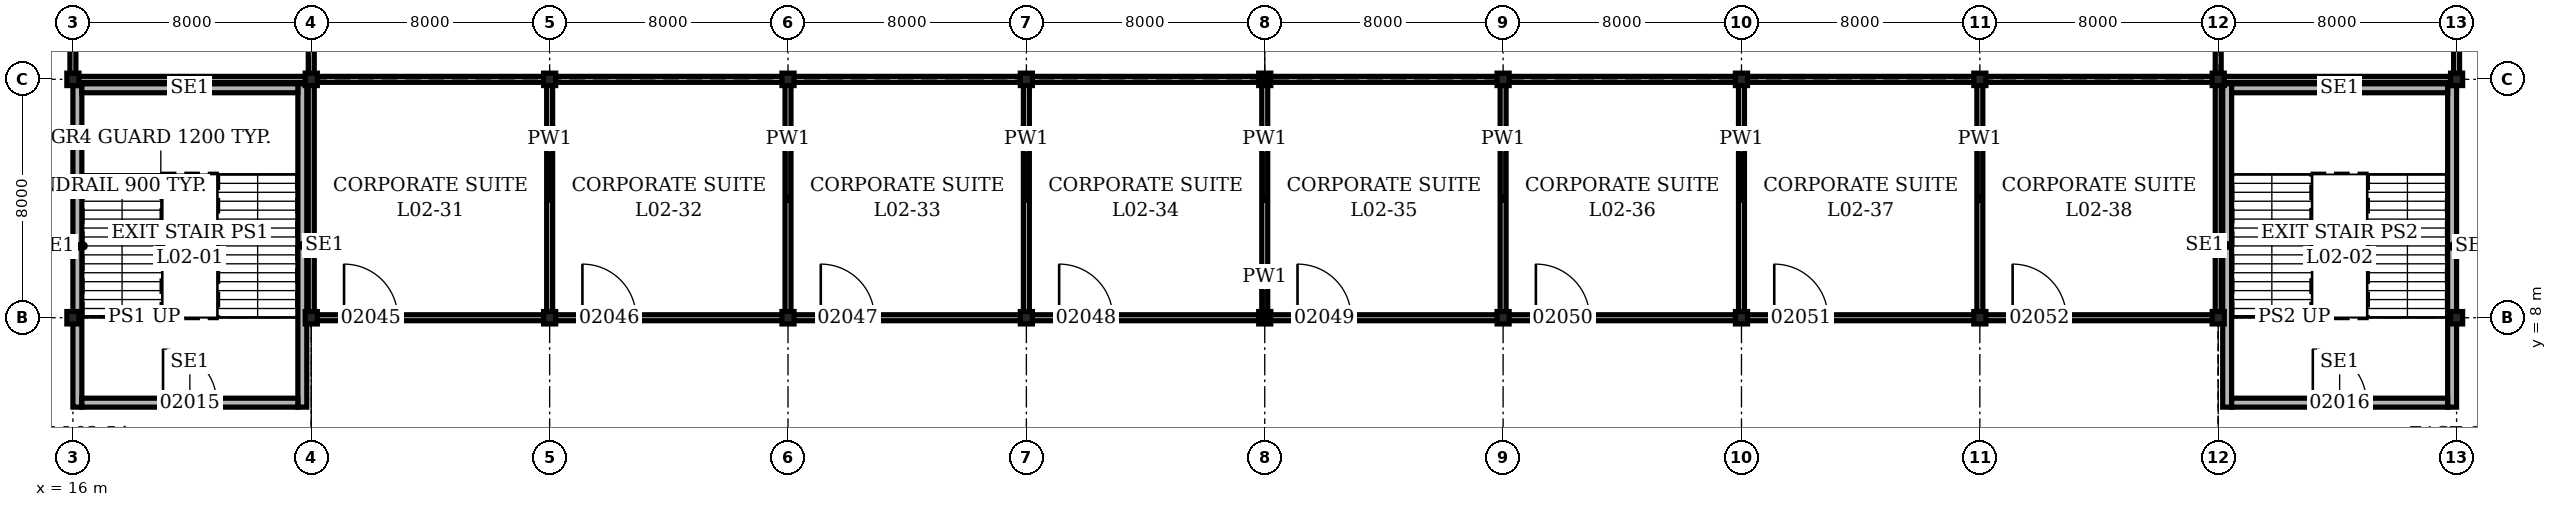
"""IFC4 building model, lengths in metres.
Left out: names, types, materials, properties, quantities, classifications, styles, units other than length and angle.
Written with IfcOpenShell. Run it as: python <this file> out.ifc"""

import sys

from ifc_helpers import new_model, si_unit, direction, frame, frame_2d, origin, origin_2d, place, context, subcontext, project, spatial, rectangle, i_section, extrude, element, fill, save


model = new_model("IFC4")
c1 = context("Model", 3, precision=1e-05, world=origin(), true_north=direction((0.0, 1.0)))
c2 = subcontext(c1, "Body", "Model", "MODEL_VIEW")
j1 = project(units=[si_unit("LENGTHUNIT", "METRE"), si_unit("PLANEANGLEUNIT", "RADIAN")], contexts=[c1])
p1 = place(None, origin())
s1 = spatial("IfcSite", under=j1, at=p1, CompositionType="ELEMENT")
p2 = place(p1, origin())
s2 = spatial("IfcBuilding", under=s1, at=p2, CompositionType="ELEMENT")
p3 = place(p2, frame((0.0, 0.0, 9.9)))
s3 = spatial("IfcBuildingStorey", under=s2, at=p3, CompositionType="ELEMENT", Elevation=9.9)
for number, where, z_axis, x_axis in (
    (1, (16.0, 8.0, 0.0), (0.0, 0.0, 1.0), (1.0, 0.0, 0.0)),
    (2, (16.0, 16.0, 0.0), (0.0, 0.0, 1.0), (1.0, 0.0, 0.0)),
    (3, (24.0, 8.0, 0.0), (0.0, 0.0, 1.0), (1.0, 0.0, 0.0)),
    (4, (24.0, 16.0, 0.0), (0.0, 0.0, 1.0), (1.0, 0.0, 0.0)),
    (5, (32.0, 8.0, 0.0), (0.0, 0.0, 1.0), (1.0, 0.0, 0.0)),
    (6, (32.0, 16.0, 0.0), (0.0, 0.0, 1.0), (1.0, 0.0, 0.0)),
    (7, (40.0, 8.0, 0.0), (0.0, 0.0, 1.0), (1.0, 0.0, 0.0)),
    (8, (40.0, 16.0, 0.0), (0.0, 0.0, 1.0), (1.0, 0.0, 0.0)),
    (9, (48.0, 8.0, 0.0), (0.0, 0.0, 1.0), (1.0, 0.0, 0.0)),
    (10, (48.0, 16.0, 0.0), (0.0, 0.0, 1.0), (1.0, 0.0, 0.0)),
    (11, (56.0, 8.0, 0.0), (0.0, 0.0, 1.0), (1.0, 0.0, 0.0)),
    (12, (56.0, 16.0, 0.0), (0.0, 0.0, 1.0), (1.0, 0.0, 0.0)),
    (13, (64.0, 8.0, 0.0), (0.0, 0.0, 1.0), (1.0, 0.0, 0.0)),
    (14, (64.0, 16.0, 0.0), (0.0, 0.0, 1.0), (1.0, 0.0, 0.0)),
    (15, (72.0, 8.0, 0.0), (0.0, 0.0, 1.0), (1.0, 0.0, 0.0)),
    (16, (72.0, 16.0, 0.0), (0.0, 0.0, 1.0), (1.0, 0.0, 0.0)),
    (17, (80.0, 8.0, 0.0), (0.0, 0.0, 1.0), (1.0, 0.0, 0.0)),
    (18, (80.0, 16.0, 0.0), (0.0, 0.0, 1.0), (1.0, 0.0, 0.0)),
    (19, (88.0, 8.0, 0.0), (0.0, 0.0, 1.0), (1.0, 0.0, 0.0)),
    (20, (88.0, 16.0, 0.0), (0.0, 0.0, 1.0), (1.0, 0.0, 0.0)),
    (21, (96.0, 8.0, 0.0), (0.0, 0.0, 1.0), (1.0, 0.0, 0.0)),
    (22, (96.0, 16.0, 0.0), (0.0, 0.0, 1.0), (1.0, 0.0, 0.0)),
):
    element("IfcColumn", number, at=place(p3, frame(where, z_axis=z_axis, x_axis=x_axis)), inside=s3, PredefinedType="COLUMN", context=c2, shape_type="SweptSolid", body=[
        extrude(i_section(OverallWidth=0.406, OverallDepth=0.417, WebThickness=0.03, FlangeThickness=0.048, at=origin_2d()), origin(), (0.0, 0.0, 1.0), 5.0),
    ])
p4 = place(p3, frame((16.15, 5.0, 0.0), z_axis=(0.0, 0.0, 1.0), x_axis=(0.0, 1.0, 0.0)))
e23 = element("IfcWall", 23, at=p4, inside=s3, PredefinedType="SOLIDWALL", context=c2, shape_type="SweptSolid", body=[
    extrude(rectangle(XDim=10.792, YDim=0.3, at=frame_2d((5.396, 0.0))), origin(), (0.0, 0.0, 1.0), 4.8),
])
p5 = place(p3, frame((23.7, 5.0, 0.0), z_axis=(0.0, 0.0, 1.0), x_axis=(0.0, 1.0, 0.0)))
e24 = element("IfcWall", 24, at=p5, inside=s3, PredefinedType="SOLIDWALL", context=c2, shape_type="SweptSolid", body=[
    extrude(rectangle(XDim=10.85, YDim=0.3, at=frame_2d((5.425, 0.0))), origin(), (0.0, 0.0, 1.0), 4.8),
])
p6 = place(p3, frame((16.3, 5.15, 0.0), z_axis=(0.0, 0.0, 1.0), x_axis=(1.0, 0.0, 0.0)))
e25 = element("IfcWall", 25, at=p6, inside=s3, PredefinedType="SOLIDWALL", context=c2, shape_type="SweptSolid", body=[
    extrude(rectangle(XDim=7.25, YDim=0.3, at=frame_2d((3.625, 0.0))), origin(), (0.0, 0.0, 1.0), 4.8),
])
p7 = place(p6, frame((2.725, 0.0, 0.0)))
e26 = element("IfcOpeningElement", 26, at=p7, cuts=e25, PredefinedType="OPENING", context=c2, shape_type="SweptSolid", body=[
    extrude(rectangle(XDim=1.8, YDim=2.1, at=frame_2d((0.9, 1.05))), frame((0.0, 0.16, 0.0), z_axis=(0.0, -1.0, 0.0), x_axis=(1.0, 0.0, 0.0)), (0.0, 0.0, 1.0), 0.32),
])
p8 = place(p3, frame((16.3, 15.7, 0.0), z_axis=(0.0, 0.0, 1.0), x_axis=(1.0, 0.0, 0.0)))
e27 = element("IfcWall", 27, at=p8, inside=s3, PredefinedType="SOLIDWALL", context=c2, shape_type="SweptSolid", body=[
    extrude(rectangle(XDim=7.25, YDim=0.3, at=frame_2d((3.625, 0.0))), origin(), (0.0, 0.0, 1.0), 4.8),
])
p9 = place(p3, frame((88.3, 5.0, 0.0), z_axis=(0.0, 0.0, 1.0), x_axis=(0.0, 1.0, 0.0)))
e28 = element("IfcWall", 28, at=p9, inside=s3, PredefinedType="SOLIDWALL", context=c2, shape_type="SweptSolid", body=[
    extrude(rectangle(XDim=10.85, YDim=0.3, at=frame_2d((5.425, 0.0))), origin(), (0.0, 0.0, 1.0), 4.8),
])
p10 = place(p3, frame((95.85, 5.0, 0.0), z_axis=(0.0, 0.0, 1.0), x_axis=(0.0, 1.0, 0.0)))
e29 = element("IfcWall", 29, at=p10, inside=s3, PredefinedType="SOLIDWALL", context=c2, shape_type="SweptSolid", body=[
    extrude(rectangle(XDim=10.792, YDim=0.3, at=frame_2d((5.396, 0.0))), origin(), (0.0, 0.0, 1.0), 4.8),
])
p11 = place(p3, frame((88.45, 5.15, 0.0), z_axis=(0.0, 0.0, 1.0), x_axis=(1.0, 0.0, 0.0)))
e30 = element("IfcWall", 30, at=p11, inside=s3, PredefinedType="SOLIDWALL", context=c2, shape_type="SweptSolid", body=[
    extrude(rectangle(XDim=7.25, YDim=0.3, at=frame_2d((3.625, 0.0))), origin(), (0.0, 0.0, 1.0), 4.8),
])
p12 = place(p11, frame((2.725, 0.0, 0.0)))
e31 = element("IfcOpeningElement", 31, at=p12, cuts=e30, PredefinedType="OPENING", context=c2, shape_type="SweptSolid", body=[
    extrude(rectangle(XDim=1.8, YDim=2.1, at=frame_2d((0.9, 1.05))), frame((0.0, 0.16, 0.0), z_axis=(0.0, -1.0, 0.0), x_axis=(1.0, 0.0, 0.0)), (0.0, 0.0, 1.0), 0.32),
])
p13 = place(p3, frame((88.45, 15.7, 0.0), z_axis=(0.0, 0.0, 1.0), x_axis=(1.0, 0.0, 0.0)))
e32 = element("IfcWall", 32, at=p13, inside=s3, PredefinedType="SOLIDWALL", context=c2, shape_type="SweptSolid", body=[
    extrude(rectangle(XDim=7.25, YDim=0.3, at=frame_2d((3.625, 0.0))), origin(), (0.0, 0.0, 1.0), 4.8),
])
p14 = place(p3, frame((24.1, 8.0, 0.0), z_axis=(0.0, 0.0, 1.0), x_axis=(1.0, 0.0, 0.0)))
e33 = element("IfcWall", 33, at=p14, inside=s3, PredefinedType="PARTITIONING", context=c2, shape_type="SweptSolid", body=[
    extrude(rectangle(XDim=63.8, YDim=0.2, at=frame_2d((31.9, 0.0))), origin(), (0.0, 0.0, 1.0), 4.028),
])
p15 = place(p14, frame((1.0, 0.0, 0.0)))
e34 = element("IfcOpeningElement", 34, at=p15, cuts=e33, PredefinedType="OPENING", context=c2, shape_type="SweptSolid", body=[
    extrude(rectangle(XDim=1.8, YDim=2.4, at=frame_2d((0.9, 1.2))), frame((0.0, 0.11, 0.0), z_axis=(0.0, -1.0, 0.0), x_axis=(1.0, 0.0, 0.0)), (0.0, 0.0, 1.0), 0.22),
])
p16 = place(p14, frame((9.0, 0.0, 0.0)))
e35 = element("IfcOpeningElement", 35, at=p16, cuts=e33, PredefinedType="OPENING", context=c2, shape_type="SweptSolid", body=[
    extrude(rectangle(XDim=1.8, YDim=2.4, at=frame_2d((0.9, 1.2))), frame((0.0, 0.11, 0.0), z_axis=(0.0, -1.0, 0.0), x_axis=(1.0, 0.0, 0.0)), (0.0, 0.0, 1.0), 0.22),
])
p17 = place(p14, frame((17.0, 0.0, 0.0)))
e36 = element("IfcOpeningElement", 36, at=p17, cuts=e33, PredefinedType="OPENING", context=c2, shape_type="SweptSolid", body=[
    extrude(rectangle(XDim=1.8, YDim=2.4, at=frame_2d((0.9, 1.2))), frame((0.0, 0.11, 0.0), z_axis=(0.0, -1.0, 0.0), x_axis=(1.0, 0.0, 0.0)), (0.0, 0.0, 1.0), 0.22),
])
p18 = place(p14, frame((25.0, 0.0, 0.0)))
e37 = element("IfcOpeningElement", 37, at=p18, cuts=e33, PredefinedType="OPENING", context=c2, shape_type="SweptSolid", body=[
    extrude(rectangle(XDim=1.8, YDim=2.4, at=frame_2d((0.9, 1.2))), frame((0.0, 0.11, 0.0), z_axis=(0.0, -1.0, 0.0), x_axis=(1.0, 0.0, 0.0)), (0.0, 0.0, 1.0), 0.22),
])
p19 = place(p14, frame((33.0, 0.0, 0.0)))
e38 = element("IfcOpeningElement", 38, at=p19, cuts=e33, PredefinedType="OPENING", context=c2, shape_type="SweptSolid", body=[
    extrude(rectangle(XDim=1.8, YDim=2.4, at=frame_2d((0.9, 1.2))), frame((0.0, 0.11, 0.0), z_axis=(0.0, -1.0, 0.0), x_axis=(1.0, 0.0, 0.0)), (0.0, 0.0, 1.0), 0.22),
])
p20 = place(p14, frame((41.0, 0.0, 0.0)))
e39 = element("IfcOpeningElement", 39, at=p20, cuts=e33, PredefinedType="OPENING", context=c2, shape_type="SweptSolid", body=[
    extrude(rectangle(XDim=1.8, YDim=2.4, at=frame_2d((0.9, 1.2))), frame((0.0, 0.11, 0.0), z_axis=(0.0, -1.0, 0.0), x_axis=(1.0, 0.0, 0.0)), (0.0, 0.0, 1.0), 0.22),
])
p21 = place(p14, frame((49.0, 0.0, 0.0)))
e40 = element("IfcOpeningElement", 40, at=p21, cuts=e33, PredefinedType="OPENING", context=c2, shape_type="SweptSolid", body=[
    extrude(rectangle(XDim=1.8, YDim=2.4, at=frame_2d((0.9, 1.2))), frame((0.0, 0.11, 0.0), z_axis=(0.0, -1.0, 0.0), x_axis=(1.0, 0.0, 0.0)), (0.0, 0.0, 1.0), 0.22),
])
p22 = place(p14, frame((57.0, 0.0, 0.0)))
e41 = element("IfcOpeningElement", 41, at=p22, cuts=e33, PredefinedType="OPENING", context=c2, shape_type="SweptSolid", body=[
    extrude(rectangle(XDim=1.8, YDim=2.4, at=frame_2d((0.9, 1.2))), frame((0.0, 0.11, 0.0), z_axis=(0.0, -1.0, 0.0), x_axis=(1.0, 0.0, 0.0)), (0.0, 0.0, 1.0), 0.22),
])
p23 = place(p3, frame((16.1, 16.0, 0.0), z_axis=(0.0, 0.0, 1.0), x_axis=(1.0, 0.0, 0.0)))
e42 = element("IfcWall", 42, at=p23, inside=s3, PredefinedType="PARTITIONING", context=c2, shape_type="SweptSolid", body=[
    extrude(rectangle(XDim=79.8, YDim=0.2, at=frame_2d((39.9, 0.0))), origin(), (0.0, 0.0, 1.0), 4.028),
])
p24 = place(p3, frame((16.0, 16.1, 0.0), z_axis=(0.0, 0.0, 1.0), x_axis=(0.0, 1.0, 0.0)))
e43 = element("IfcWall", 43, at=p24, inside=s3, PredefinedType="PARTITIONING", context=c2, shape_type="SweptSolid", body=[
    extrude(rectangle(XDim=47.8, YDim=0.2, at=frame_2d((23.9, 0.0))), origin(), (0.0, 0.0, 1.0), 4.028),
])
p25 = place(p24, frame((1.0, 0.0, 0.0)))
e44 = element("IfcOpeningElement", 44, at=p25, cuts=e43, PredefinedType="OPENING", context=c2, shape_type="SweptSolid", body=[
    extrude(rectangle(XDim=1.8, YDim=2.4, at=frame_2d((0.9, 1.2))), frame((0.0, 0.11, 0.0), z_axis=(0.0, -1.0, 0.0), x_axis=(1.0, 0.0, 0.0)), (0.0, 0.0, 1.0), 0.22),
])
p26 = place(p24, frame((9.0, 0.0, 0.0)))
e45 = element("IfcOpeningElement", 45, at=p26, cuts=e43, PredefinedType="OPENING", context=c2, shape_type="SweptSolid", body=[
    extrude(rectangle(XDim=1.8, YDim=2.4, at=frame_2d((0.9, 1.2))), frame((0.0, 0.11, 0.0), z_axis=(0.0, -1.0, 0.0), x_axis=(1.0, 0.0, 0.0)), (0.0, 0.0, 1.0), 0.22),
])
p27 = place(p24, frame((17.0, 0.0, 0.0)))
e46 = element("IfcOpeningElement", 46, at=p27, cuts=e43, PredefinedType="OPENING", context=c2, shape_type="SweptSolid", body=[
    extrude(rectangle(XDim=1.8, YDim=2.4, at=frame_2d((0.9, 1.2))), frame((0.0, 0.11, 0.0), z_axis=(0.0, -1.0, 0.0), x_axis=(1.0, 0.0, 0.0)), (0.0, 0.0, 1.0), 0.22),
])
p28 = place(p24, frame((25.0, 0.0, 0.0)))
e47 = element("IfcOpeningElement", 47, at=p28, cuts=e43, PredefinedType="OPENING", context=c2, shape_type="SweptSolid", body=[
    extrude(rectangle(XDim=1.8, YDim=2.4, at=frame_2d((0.9, 1.2))), frame((0.0, 0.11, 0.0), z_axis=(0.0, -1.0, 0.0), x_axis=(1.0, 0.0, 0.0)), (0.0, 0.0, 1.0), 0.22),
])
p29 = place(p24, frame((33.0, 0.0, 0.0)))
e48 = element("IfcOpeningElement", 48, at=p29, cuts=e43, PredefinedType="OPENING", context=c2, shape_type="SweptSolid", body=[
    extrude(rectangle(XDim=1.8, YDim=2.4, at=frame_2d((0.9, 1.2))), frame((0.0, 0.11, 0.0), z_axis=(0.0, -1.0, 0.0), x_axis=(1.0, 0.0, 0.0)), (0.0, 0.0, 1.0), 0.22),
])
p30 = place(p24, frame((41.0, 0.0, 0.0)))
e49 = element("IfcOpeningElement", 49, at=p30, cuts=e43, PredefinedType="OPENING", context=c2, shape_type="SweptSolid", body=[
    extrude(rectangle(XDim=1.8, YDim=2.4, at=frame_2d((0.9, 1.2))), frame((0.0, 0.11, 0.0), z_axis=(0.0, -1.0, 0.0), x_axis=(1.0, 0.0, 0.0)), (0.0, 0.0, 1.0), 0.22),
])
p31 = place(p3, frame((24.0, 8.1, 0.0), z_axis=(0.0, 0.0, 1.0), x_axis=(0.0, 1.0, 0.0)))
e50 = element("IfcWall", 50, at=p31, inside=s3, PredefinedType="PARTITIONING", context=c2, shape_type="SweptSolid", body=[
    extrude(rectangle(XDim=55.8, YDim=0.2, at=frame_2d((27.9, 0.0))), origin(), (0.0, 0.0, 1.0), 4.028),
])
for number, where, z_axis, x_axis in (
    (51, (32.0, 8.1, 0.0), (0.0, 0.0, 1.0), (0.0, 1.0, 0.0)),
    (52, (40.0, 8.1, 0.0), (0.0, 0.0, 1.0), (0.0, 1.0, 0.0)),
    (53, (48.0, 8.1, 0.0), (0.0, 0.0, 1.0), (0.0, 1.0, 0.0)),
    (54, (56.0, 8.1, 0.0), (0.0, 0.0, 1.0), (0.0, 1.0, 0.0)),
    (55, (64.0, 8.1, 0.0), (0.0, 0.0, 1.0), (0.0, 1.0, 0.0)),
    (56, (72.0, 8.1, 0.0), (0.0, 0.0, 1.0), (0.0, 1.0, 0.0)),
    (57, (80.0, 8.1, 0.0), (0.0, 0.0, 1.0), (0.0, 1.0, 0.0)),
):
    element("IfcWall", number, at=place(p3, frame(where, z_axis=z_axis, x_axis=x_axis)), inside=s3, PredefinedType="PARTITIONING", context=c2, shape_type="SweptSolid", body=[
        extrude(rectangle(XDim=7.8, YDim=0.2, at=frame_2d((3.9, 0.0))), origin(), (0.0, 0.0, 1.0), 4.072),
    ])
p32 = place(p3, frame((88.0, 8.1, 0.0), z_axis=(0.0, 0.0, 1.0), x_axis=(0.0, 1.0, 0.0)))
e58 = element("IfcWall", 58, at=p32, inside=s3, PredefinedType="PARTITIONING", context=c2, shape_type="SweptSolid", body=[
    extrude(rectangle(XDim=55.8, YDim=0.2, at=frame_2d((27.9, 0.0))), origin(), (0.0, 0.0, 1.0), 4.028),
])
p33 = place(p3, frame((96.0, 16.1, 0.0), z_axis=(0.0, 0.0, 1.0), x_axis=(0.0, 1.0, 0.0)))
e59 = element("IfcWall", 59, at=p33, inside=s3, PredefinedType="PARTITIONING", context=c2, shape_type="SweptSolid", body=[
    extrude(rectangle(XDim=47.8, YDim=0.2, at=frame_2d((23.9, 0.0))), origin(), (0.0, 0.0, 1.0), 4.028),
])
p34 = place(p33, frame((1.0, 0.0, 0.0)))
e60 = element("IfcOpeningElement", 60, at=p34, cuts=e59, PredefinedType="OPENING", context=c2, shape_type="SweptSolid", body=[
    extrude(rectangle(XDim=1.8, YDim=2.4, at=frame_2d((0.9, 1.2))), frame((0.0, 0.11, 0.0), z_axis=(0.0, -1.0, 0.0), x_axis=(1.0, 0.0, 0.0)), (0.0, 0.0, 1.0), 0.22),
])
p35 = place(p33, frame((9.0, 0.0, 0.0)))
e61 = element("IfcOpeningElement", 61, at=p35, cuts=e59, PredefinedType="OPENING", context=c2, shape_type="SweptSolid", body=[
    extrude(rectangle(XDim=1.8, YDim=2.4, at=frame_2d((0.9, 1.2))), frame((0.0, 0.11, 0.0), z_axis=(0.0, -1.0, 0.0), x_axis=(1.0, 0.0, 0.0)), (0.0, 0.0, 1.0), 0.22),
])
p36 = place(p33, frame((17.0, 0.0, 0.0)))
e62 = element("IfcOpeningElement", 62, at=p36, cuts=e59, PredefinedType="OPENING", context=c2, shape_type="SweptSolid", body=[
    extrude(rectangle(XDim=1.8, YDim=2.4, at=frame_2d((0.9, 1.2))), frame((0.0, 0.11, 0.0), z_axis=(0.0, -1.0, 0.0), x_axis=(1.0, 0.0, 0.0)), (0.0, 0.0, 1.0), 0.22),
])
p37 = place(p33, frame((25.0, 0.0, 0.0)))
e63 = element("IfcOpeningElement", 63, at=p37, cuts=e59, PredefinedType="OPENING", context=c2, shape_type="SweptSolid", body=[
    extrude(rectangle(XDim=1.8, YDim=2.4, at=frame_2d((0.9, 1.2))), frame((0.0, 0.11, 0.0), z_axis=(0.0, -1.0, 0.0), x_axis=(1.0, 0.0, 0.0)), (0.0, 0.0, 1.0), 0.22),
])
p38 = place(p33, frame((33.0, 0.0, 0.0)))
e64 = element("IfcOpeningElement", 64, at=p38, cuts=e59, PredefinedType="OPENING", context=c2, shape_type="SweptSolid", body=[
    extrude(rectangle(XDim=1.8, YDim=2.4, at=frame_2d((0.9, 1.2))), frame((0.0, 0.11, 0.0), z_axis=(0.0, -1.0, 0.0), x_axis=(1.0, 0.0, 0.0)), (0.0, 0.0, 1.0), 0.22),
])
p39 = place(p33, frame((41.0, 0.0, 0.0)))
e65 = element("IfcOpeningElement", 65, at=p39, cuts=e59, PredefinedType="OPENING", context=c2, shape_type="SweptSolid", body=[
    extrude(rectangle(XDim=1.8, YDim=2.4, at=frame_2d((0.9, 1.2))), frame((0.0, 0.11, 0.0), z_axis=(0.0, -1.0, 0.0), x_axis=(1.0, 0.0, 0.0)), (0.0, 0.0, 1.0), 0.22),
])
p40 = place(p7, origin())
e66 = element("IfcDoor", 66, at=p40, inside=s3, OperationType="DOUBLE_DOOR_SINGLE_SWING", PredefinedType="DOOR", context=c2, shape_type="SweptSolid", body=[
    extrude(rectangle(XDim=1.8, YDim=2.1, at=frame_2d((0.9, 1.05))), frame((0.0, 0.15, 0.0), z_axis=(0.0, -1.0, 0.0), x_axis=(1.0, 0.0, 0.0)), (0.0, 0.0, 1.0), 0.3),
])
fill(e26, e66)
p41 = place(p12, origin())
e67 = element("IfcDoor", 67, at=p41, inside=s3, OperationType="DOUBLE_DOOR_SINGLE_SWING", PredefinedType="DOOR", context=c2, shape_type="SweptSolid", body=[
    extrude(rectangle(XDim=1.8, YDim=2.1, at=frame_2d((0.9, 1.05))), frame((0.0, 0.15, 0.0), z_axis=(0.0, -1.0, 0.0), x_axis=(1.0, 0.0, 0.0)), (0.0, 0.0, 1.0), 0.3),
])
fill(e31, e67)
p42 = place(p15, origin())
e68 = element("IfcDoor", 68, at=p42, inside=s3, OperationType="DOUBLE_DOOR_DOUBLE_SWING", PredefinedType="DOOR", context=c2, shape_type="SweptSolid", body=[
    extrude(rectangle(XDim=1.8, YDim=2.4, at=frame_2d((0.9, 1.2))), frame((0.0, 0.1, 0.0), z_axis=(0.0, -1.0, 0.0), x_axis=(1.0, 0.0, 0.0)), (0.0, 0.0, 1.0), 0.199),
])
fill(e34, e68)
p43 = place(p16, origin())
e69 = element("IfcDoor", 69, at=p43, inside=s3, OperationType="DOUBLE_DOOR_DOUBLE_SWING", PredefinedType="DOOR", context=c2, shape_type="SweptSolid", body=[
    extrude(rectangle(XDim=1.8, YDim=2.4, at=frame_2d((0.9, 1.2))), frame((0.0, 0.1, 0.0), z_axis=(0.0, -1.0, 0.0), x_axis=(1.0, 0.0, 0.0)), (0.0, 0.0, 1.0), 0.199),
])
fill(e35, e69)
p44 = place(p17, origin())
e70 = element("IfcDoor", 70, at=p44, inside=s3, OperationType="DOUBLE_DOOR_DOUBLE_SWING", PredefinedType="DOOR", context=c2, shape_type="SweptSolid", body=[
    extrude(rectangle(XDim=1.8, YDim=2.4, at=frame_2d((0.9, 1.2))), frame((0.0, 0.1, 0.0), z_axis=(0.0, -1.0, 0.0), x_axis=(1.0, 0.0, 0.0)), (0.0, 0.0, 1.0), 0.199),
])
fill(e36, e70)
p45 = place(p18, origin())
e71 = element("IfcDoor", 71, at=p45, inside=s3, OperationType="DOUBLE_DOOR_DOUBLE_SWING", PredefinedType="DOOR", context=c2, shape_type="SweptSolid", body=[
    extrude(rectangle(XDim=1.8, YDim=2.4, at=frame_2d((0.9, 1.2))), frame((0.0, 0.1, 0.0), z_axis=(0.0, -1.0, 0.0), x_axis=(1.0, 0.0, 0.0)), (0.0, 0.0, 1.0), 0.199),
])
fill(e37, e71)
p46 = place(p19, origin())
e72 = element("IfcDoor", 72, at=p46, inside=s3, OperationType="DOUBLE_DOOR_DOUBLE_SWING", PredefinedType="DOOR", context=c2, shape_type="SweptSolid", body=[
    extrude(rectangle(XDim=1.8, YDim=2.4, at=frame_2d((0.9, 1.2))), frame((0.0, 0.1, 0.0), z_axis=(0.0, -1.0, 0.0), x_axis=(1.0, 0.0, 0.0)), (0.0, 0.0, 1.0), 0.199),
])
fill(e38, e72)
p47 = place(p20, origin())
e73 = element("IfcDoor", 73, at=p47, inside=s3, OperationType="DOUBLE_DOOR_DOUBLE_SWING", PredefinedType="DOOR", context=c2, shape_type="SweptSolid", body=[
    extrude(rectangle(XDim=1.8, YDim=2.4, at=frame_2d((0.9, 1.2))), frame((0.0, 0.1, 0.0), z_axis=(0.0, -1.0, 0.0), x_axis=(1.0, 0.0, 0.0)), (0.0, 0.0, 1.0), 0.199),
])
fill(e39, e73)
p48 = place(p21, origin())
e74 = element("IfcDoor", 74, at=p48, inside=s3, OperationType="DOUBLE_DOOR_DOUBLE_SWING", PredefinedType="DOOR", context=c2, shape_type="SweptSolid", body=[
    extrude(rectangle(XDim=1.8, YDim=2.4, at=frame_2d((0.9, 1.2))), frame((0.0, 0.1, 0.0), z_axis=(0.0, -1.0, 0.0), x_axis=(1.0, 0.0, 0.0)), (0.0, 0.0, 1.0), 0.199),
])
fill(e40, e74)
p49 = place(p22, origin())
e75 = element("IfcDoor", 75, at=p49, inside=s3, OperationType="DOUBLE_DOOR_DOUBLE_SWING", PredefinedType="DOOR", context=c2, shape_type="SweptSolid", body=[
    extrude(rectangle(XDim=1.8, YDim=2.4, at=frame_2d((0.9, 1.2))), frame((0.0, 0.1, 0.0), z_axis=(0.0, -1.0, 0.0), x_axis=(1.0, 0.0, 0.0)), (0.0, 0.0, 1.0), 0.199),
])
fill(e41, e75)
save(model, sys.argv[1])
